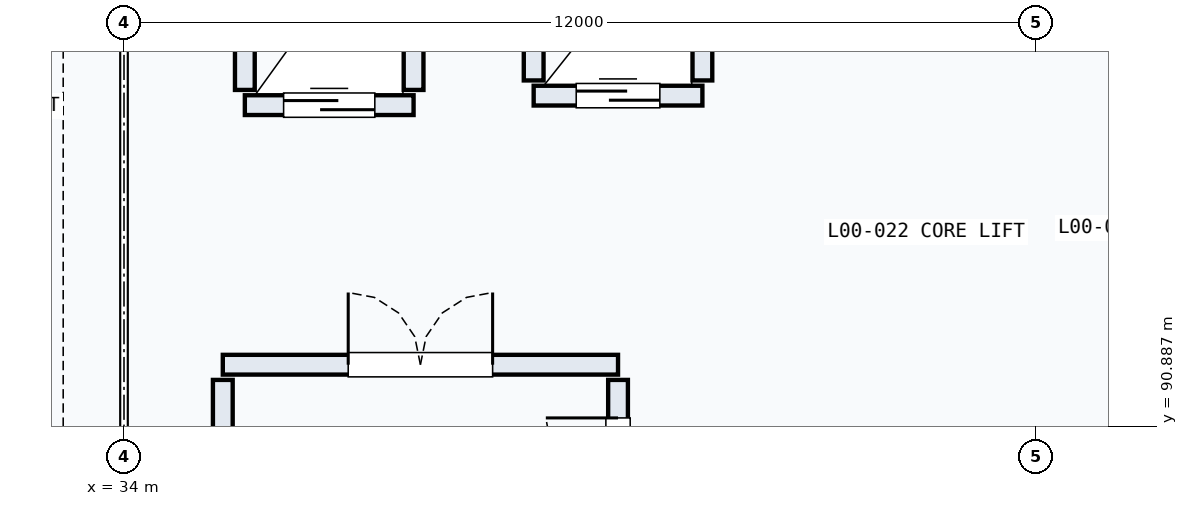
"""IFC4 building model, lengths in metres.
Left out: names, types, materials, properties, quantities, classifications, styles, units other than length and angle.
Written with IfcOpenShell. Run it as: python <this file> out.ifc"""

import sys

from ifc_helpers import new_model, si_unit, direction, frame, frame_2d, origin, place, context, subcontext, project, spatial, rectangle, extrude, element, fill, save


model = new_model("IFC4")
c1 = context("Model", 3, precision=1e-05, world=origin(), true_north=direction((0.0, 1.0)))
c2 = subcontext(c1, "Body", "Model", "MODEL_VIEW")
j1 = project(units=[si_unit("LENGTHUNIT", "METRE"), si_unit("PLANEANGLEUNIT", "RADIAN")], contexts=[c1])
p1 = place(None, origin())
s1 = spatial("IfcSite", under=j1, at=p1, CompositionType="ELEMENT")
p2 = place(p1, origin())
s2 = spatial("IfcBuilding", under=s1, at=p2, CompositionType="ELEMENT")
p3 = place(p2, origin())
s3 = spatial("IfcBuildingStorey", under=s2, at=p3, CompositionType="ELEMENT", Elevation=0.0)
p4 = place(p3, frame((35.59, 95.115, 0.0), z_axis=(0.0, 0.0, 1.0), x_axis=(1.0, 0.0, 0.0)))
e1 = element("IfcWall", 1, at=p4, inside=s3, PredefinedType="SOLIDWALL", context=c2, shape_type="SweptSolid", body=[
    extrude(rectangle(XDim=2.22, YDim=0.26, at=frame_2d((1.11, 0.0))), origin(), (0.0, 0.0, 1.0), 5.06),
])
p5 = place(p4, frame((0.51, 0.0, 0.0)))
e2 = element("IfcOpeningElement", 2, at=p5, cuts=e1, PredefinedType="OPENING", context=c2, shape_type="SweptSolid", body=[
    extrude(rectangle(XDim=1.2, YDim=2.2, at=frame_2d((0.6, 1.1))), frame((0.0, 0.14, 0.0), z_axis=(0.0, -1.0, 0.0), x_axis=(1.0, 0.0, 0.0)), (0.0, 0.0, 1.0), 0.28),
])
for number, where, z_axis, x_axis in (
    (3, (35.59, 95.315, 0.0), (0.0, 0.0, 1.0), (0.0, 1.0, 0.0)),
    (4, (37.81, 95.315, 0.0), (0.0, 0.0, 1.0), (0.0, 1.0, 0.0)),
):
    element("IfcWall", number, at=place(p3, frame(where, z_axis=z_axis, x_axis=x_axis)), inside=s3, PredefinedType="SOLIDWALL", context=c2, shape_type="SweptSolid", body=[
        extrude(rectangle(XDim=2.57, YDim=0.26, at=frame_2d((1.285, 0.0))), origin(), (0.0, 0.0, 1.0), 5.06),
    ])
p6 = place(p3, frame((39.39, 95.24, 0.0), z_axis=(0.0, 0.0, 1.0), x_axis=(1.0, 0.0, 0.0)))
e5 = element("IfcWall", 5, at=p6, inside=s3, PredefinedType="SOLIDWALL", context=c2, shape_type="SweptSolid", body=[
    extrude(rectangle(XDim=2.22, YDim=0.26, at=frame_2d((1.11, 0.0))), origin(), (0.0, 0.0, 1.0), 5.06),
])
p7 = place(p6, frame((0.56, 0.0, 0.0)))
e6 = element("IfcOpeningElement", 6, at=p7, cuts=e5, PredefinedType="OPENING", context=c2, shape_type="SweptSolid", body=[
    extrude(rectangle(XDim=1.1, YDim=2.15, at=frame_2d((0.55, 1.075))), frame((0.0, 0.14, 0.0), z_axis=(0.0, -1.0, 0.0), x_axis=(1.0, 0.0, 0.0)), (0.0, 0.0, 1.0), 0.28),
])
for number, where, z_axis, x_axis in (
    (7, (39.39, 95.44, 0.0), (0.0, 0.0, 1.0), (0.0, 1.0, 0.0)),
    (8, (41.61, 95.44, 0.0), (0.0, 0.0, 1.0), (0.0, 1.0, 0.0)),
):
    element("IfcWall", number, at=place(p3, frame(where, z_axis=z_axis, x_axis=x_axis)), inside=s3, PredefinedType="SOLIDWALL", context=c2, shape_type="SweptSolid", body=[
        extrude(rectangle(XDim=2.32, YDim=0.26, at=frame_2d((1.16, 0.0))), origin(), (0.0, 0.0, 1.0), 5.06),
    ])
p8 = place(p3, frame((35.3, 91.7, 0.0), z_axis=(0.0, 0.0, 1.0), x_axis=(1.0, 0.0, 0.0)))
e9 = element("IfcWall", 9, at=p8, inside=s3, PredefinedType="SOLIDWALL", context=c2, shape_type="SweptSolid", body=[
    extrude(rectangle(XDim=5.2, YDim=0.26, at=frame_2d((2.6, 0.0))), origin(), (0.0, 0.0, 1.0), 5.06),
])
p9 = place(p8, frame((1.65, 0.0, 0.0)))
e10 = element("IfcOpeningElement", 10, at=p9, cuts=e9, PredefinedType="OPENING", context=c2, shape_type="SweptSolid", body=[
    extrude(rectangle(XDim=1.9, YDim=2.2, at=frame_2d((0.95, 1.1))), frame((0.0, 0.14, 0.0), z_axis=(0.0, -1.0, 0.0), x_axis=(1.0, 0.0, 0.0)), (0.0, 0.0, 1.0), 0.28),
])
p10 = place(p3, frame((35.3, 88.6, 0.0), z_axis=(0.0, 0.0, 1.0), x_axis=(0.0, 1.0, 0.0)))
e11 = element("IfcWall", 11, at=p10, inside=s3, PredefinedType="SOLIDWALL", context=c2, shape_type="SweptSolid", body=[
    extrude(rectangle(XDim=2.9, YDim=0.26, at=frame_2d((1.45, 0.0))), origin(), (0.0, 0.0, 1.0), 5.06),
])
p11 = place(p3, frame((40.5, 88.6, 0.0), z_axis=(0.0, 0.0, 1.0), x_axis=(0.0, 1.0, 0.0)))
e12 = element("IfcWall", 12, at=p11, inside=s3, PredefinedType="SOLIDWALL", context=c2, shape_type="SweptSolid", body=[
    extrude(rectangle(XDim=2.9, YDim=0.26, at=frame_2d((1.45, 0.0))), origin(), (0.0, 0.0, 1.0), 5.06),
])
p12 = place(p11, frame((0.5, 0.0, 0.0)))
e13 = element("IfcOpeningElement", 13, at=p12, cuts=e12, PredefinedType="OPENING", context=c2, shape_type="SweptSolid", body=[
    extrude(rectangle(XDim=1.9, YDim=2.2, at=frame_2d((0.95, 1.1))), frame((0.0, 0.14, 0.0), z_axis=(0.0, -1.0, 0.0), x_axis=(1.0, 0.0, 0.0)), (0.0, 0.0, 1.0), 0.28),
])
p13 = place(p5, origin())
e14 = element("IfcDoor", 14, at=p13, inside=s3, OperationType="SLIDING_TO_LEFT", PredefinedType="DOOR", context=c2, shape_type="SweptSolid", body=[
    extrude(rectangle(XDim=1.2, YDim=2.2, at=frame_2d((0.6, 1.1))), frame((0.0, 0.025, 0.0), z_axis=(0.0, -1.0, 0.0), x_axis=(1.0, 0.0, 0.0)), (0.0, 0.0, 1.0), 0.05),
])
fill(e2, e14)
p14 = place(p7, origin())
e15 = element("IfcDoor", 15, at=p14, inside=s3, OperationType="SLIDING_TO_LEFT", PredefinedType="DOOR", context=c2, shape_type="SweptSolid", body=[
    extrude(rectangle(XDim=1.1, YDim=2.15, at=frame_2d((0.55, 1.075))), frame((0.0, 0.025, 0.0), z_axis=(0.0, -1.0, 0.0), x_axis=(1.0, 0.0, 0.0)), (0.0, 0.0, 1.0), 0.05),
])
fill(e6, e15)
p15 = place(p9, origin())
e16 = element("IfcDoor", 16, at=p15, inside=s3, OperationType="DOUBLE_DOOR_SINGLE_SWING", PredefinedType="DOOR", context=c2, shape_type="SweptSolid", body=[
    extrude(rectangle(XDim=1.9, YDim=2.2, at=frame_2d((0.95, 1.1))), frame((0.0, 0.025, 0.0), z_axis=(0.0, -1.0, 0.0), x_axis=(1.0, 0.0, 0.0)), (0.0, 0.0, 1.0), 0.05),
])
fill(e10, e16)
p16 = place(p12, origin())
e17 = element("IfcDoor", 17, at=p16, inside=s3, OperationType="DOUBLE_DOOR_SINGLE_SWING", PredefinedType="DOOR", context=c2, shape_type="SweptSolid", body=[
    extrude(rectangle(XDim=1.9, YDim=2.2, at=frame_2d((0.95, 1.1))), frame((0.0, 0.025, 0.0), z_axis=(0.0, -1.0, 0.0), x_axis=(1.0, 0.0, 0.0)), (0.0, 0.0, 1.0), 0.05),
])
fill(e13, e17)
save(model, sys.argv[1])
